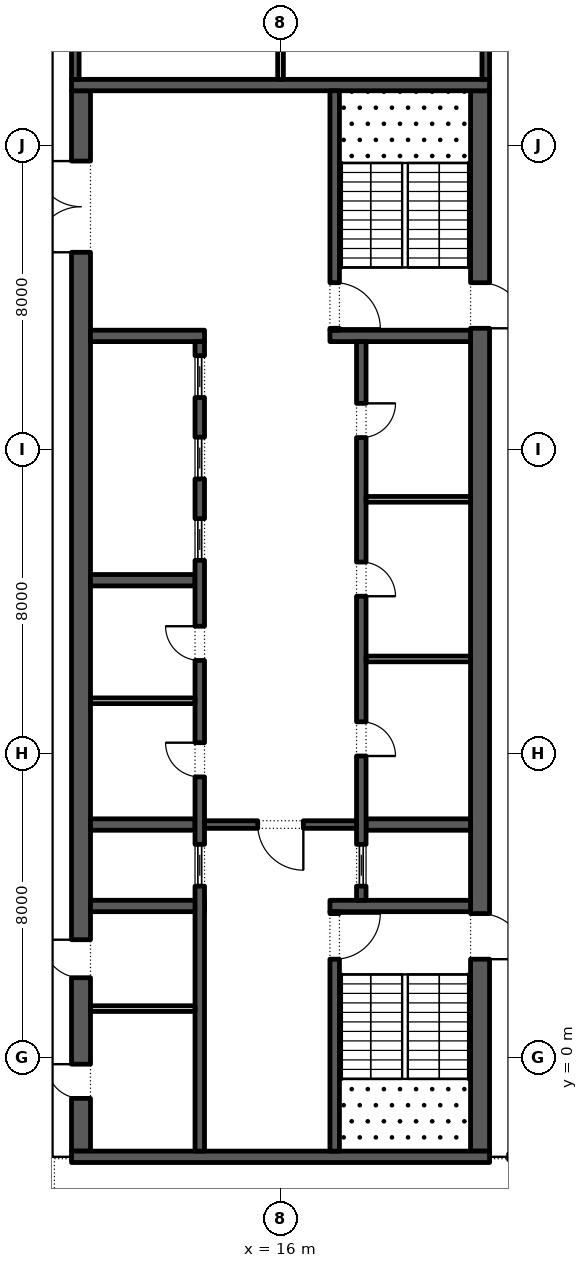
"""IFC4 building model, lengths in metres.
Left out: names, types, materials, properties, quantities, classifications, styles, units other than length and angle.
Written with IfcOpenShell. Run it as: python <this file> out.ifc"""

import sys

from ifc_helpers import new_model, si_unit, direction, frame, frame_2d, origin, place, context, subcontext, project, spatial, rectangle, extrude, element, fill, save


model = new_model("IFC4")
c1 = context("Model", 3, precision=1e-05, world=origin(), true_north=direction((0.0, 1.0)))
c2 = subcontext(c1, "Body", "Model", "MODEL_VIEW")
j1 = project(units=[si_unit("LENGTHUNIT", "METRE"), si_unit("PLANEANGLEUNIT", "RADIAN")], contexts=[c1])
p1 = place(None, origin())
s1 = spatial("IfcSite", under=j1, at=p1, CompositionType="ELEMENT")
p2 = place(p1, origin())
s2 = spatial("IfcBuilding", under=s1, at=p2, CompositionType="ELEMENT")
p3 = place(p2, frame((0.0, 0.0, 313.2)))
s3 = spatial("IfcBuildingStorey", under=s2, at=p3, CompositionType="ELEMENT", Elevation=313.2)
p4 = place(p3, frame((21.25, -2.45, 0.0), z_axis=(0.0, 0.0, 1.0), x_axis=(0.0, 1.0, 0.0)))
e1 = element("IfcWall", 1, at=p4, inside=s3, PredefinedType="SHEAR", context=c2, shape_type="SweptSolid", body=[
    extrude(rectangle(XDim=27.9, YDim=0.5, at=frame_2d((13.95, 0.0))), origin(), (0.0, 0.0, 1.0), 4.0),
])
p5 = place(p4, frame((5.05, 0.0, 0.0)))
e2 = element("IfcOpeningElement", 2, at=p5, cuts=e1, PredefinedType="OPENING", context=c2, shape_type="SweptSolid", body=[
    extrude(rectangle(XDim=1.2, YDim=2.1, at=frame_2d((0.6, 1.05))), frame((0.0, 0.26, 0.0), z_axis=(0.0, -1.0, 0.0), x_axis=(1.0, 0.0, 0.0)), (0.0, 0.0, 1.0), 0.52),
])
p6 = place(p4, frame((21.65, 0.0, 0.0)))
e3 = element("IfcOpeningElement", 3, at=p6, cuts=e1, PredefinedType="OPENING", context=c2, shape_type="SweptSolid", body=[
    extrude(rectangle(XDim=1.2, YDim=2.1, at=frame_2d((0.6, 1.05))), frame((0.0, 0.26, 0.0), z_axis=(0.0, -1.0, 0.0), x_axis=(1.0, 0.0, 0.0)), (0.0, 0.0, 1.0), 0.52),
])
p7 = place(p3, frame((10.75, -2.45, 0.0), z_axis=(0.0, 0.0, 1.0), x_axis=(0.0, 1.0, 0.0)))
e4 = element("IfcWall", 4, at=p7, inside=s3, PredefinedType="SHEAR", context=c2, shape_type="SweptSolid", body=[
    extrude(rectangle(XDim=27.9, YDim=0.5, at=frame_2d((13.95, 0.0))), origin(), (0.0, 0.0, 1.0), 4.0),
])
p8 = place(p7, frame((23.65, 0.0, 0.0)))
e5 = element("IfcOpeningElement", 5, at=p8, cuts=e4, PredefinedType="OPENING", context=c2, shape_type="SweptSolid", body=[
    extrude(rectangle(XDim=2.4, YDim=2.1, at=frame_2d((1.2, 1.05))), frame((0.0, 0.26, 0.0), z_axis=(0.0, -1.0, 0.0), x_axis=(1.0, 0.0, 0.0)), (0.0, 0.0, 1.0), 0.52),
])
p9 = place(p7, frame((1.387, 0.0, 0.0)))
e6 = element("IfcOpeningElement", 6, at=p9, cuts=e4, PredefinedType="OPENING", context=c2, shape_type="SweptSolid", body=[
    extrude(rectangle(XDim=0.9, YDim=2.1, at=frame_2d((0.45, 1.05))), frame((0.0, 0.26, 0.0), z_axis=(0.0, -1.0, 0.0), x_axis=(1.0, 0.0, 0.0)), (0.0, 0.0, 1.0), 0.52),
])
p10 = place(p7, frame((4.562, 0.0, 0.0)))
e7 = element("IfcOpeningElement", 7, at=p10, cuts=e4, PredefinedType="OPENING", context=c2, shape_type="SweptSolid", body=[
    extrude(rectangle(XDim=1.0, YDim=2.1, at=frame_2d((0.5, 1.05))), frame((0.0, 0.26, 0.0), z_axis=(0.0, -1.0, 0.0), x_axis=(1.0, 0.0, 0.0)), (0.0, 0.0, 1.0), 0.52),
])
for number, where, z_axis, x_axis in (
    (8, (10.5, -2.6, 0.0), (0.0, 0.0, 1.0), (1.0, 0.0, 0.0)),
    (9, (10.5, 25.6, 0.0), (0.0, 0.0, 1.0), (1.0, 0.0, 0.0)),
):
    element("IfcWall", number, at=place(p3, frame(where, z_axis=z_axis, x_axis=x_axis)), inside=s3, PredefinedType="SHEAR", context=c2, shape_type="SweptSolid", body=[
        extrude(rectangle(XDim=11.0, YDim=0.3, at=frame_2d((5.5, 0.0))), origin(), (0.0, 0.0, 1.0), 4.0),
    ])
p11 = place(p3, frame((17.3, 4.0, 0.0), z_axis=(0.0, 0.0, 1.0), x_axis=(1.0, 0.0, 0.0)))
e10 = element("IfcWall", 10, at=p11, inside=s3, PredefinedType="SHEAR", context=c2, shape_type="SweptSolid", body=[
    extrude(rectangle(XDim=3.7, YDim=0.3, at=frame_2d((1.85, 0.0))), origin(), (0.0, 0.0, 1.0), 4.0),
])
p12 = place(p3, frame((17.425, -2.45, 0.0), z_axis=(0.0, 0.0, 1.0), x_axis=(0.0, 1.0, 0.0)))
e11 = element("IfcWall", 11, at=p12, inside=s3, PredefinedType="SHEAR", context=c2, shape_type="SweptSolid", body=[
    extrude(rectangle(XDim=6.3, YDim=0.25, at=frame_2d((3.15, 0.0))), origin(), (0.0, 0.0, 1.0), 4.0),
])
p13 = place(p12, frame((5.05, 0.0, 0.0)))
e12 = element("IfcOpeningElement", 12, at=p13, cuts=e11, PredefinedType="OPENING", context=c2, shape_type="SweptSolid", body=[
    extrude(rectangle(XDim=1.2, YDim=2.1, at=frame_2d((0.6, 1.05))), frame((0.0, 0.135, 0.0), z_axis=(0.0, -1.0, 0.0), x_axis=(1.0, 0.0, 0.0)), (0.0, 0.0, 1.0), 0.27),
])
p14 = place(p3, frame((17.3, 19.0, 0.0), z_axis=(0.0, 0.0, 1.0), x_axis=(1.0, 0.0, 0.0)))
e13 = element("IfcWall", 13, at=p14, inside=s3, PredefinedType="SHEAR", context=c2, shape_type="SweptSolid", body=[
    extrude(rectangle(XDim=3.7, YDim=0.3, at=frame_2d((1.85, 0.0))), origin(), (0.0, 0.0, 1.0), 4.0),
])
p15 = place(p3, frame((17.425, 19.15, 0.0), z_axis=(0.0, 0.0, 1.0), x_axis=(0.0, 1.0, 0.0)))
e14 = element("IfcWall", 14, at=p15, inside=s3, PredefinedType="SHEAR", context=c2, shape_type="SweptSolid", body=[
    extrude(rectangle(XDim=6.3, YDim=0.25, at=frame_2d((3.15, 0.0))), origin(), (0.0, 0.0, 1.0), 4.0),
])
p16 = place(p15, frame((0.05, 0.0, 0.0)))
e15 = element("IfcOpeningElement", 15, at=p16, cuts=e14, PredefinedType="OPENING", context=c2, shape_type="SweptSolid", body=[
    extrude(rectangle(XDim=1.2, YDim=2.1, at=frame_2d((0.6, 1.05))), frame((0.0, 0.135, 0.0), z_axis=(0.0, -1.0, 0.0), x_axis=(1.0, 0.0, 0.0)), (0.0, 0.0, 1.0), 0.27),
])
p17 = place(p3, frame((18.25, 6.143, 0.0), z_axis=(0.0, 0.0, 1.0), x_axis=(1.0, 0.0, 0.0)))
e16 = element("IfcWall", 16, at=p17, inside=s3, PredefinedType="SHEAR", context=c2, shape_type="SweptSolid", body=[
    extrude(rectangle(XDim=2.75, YDim=0.3, at=frame_2d((1.375, 0.0))), origin(), (0.0, 0.0, 1.0), 4.0),
])
p18 = place(p3, frame((18.125, 4.15, 0.0), z_axis=(0.0, 0.0, 1.0), x_axis=(0.0, 1.0, 0.0)))
e17 = element("IfcWall", 17, at=p18, inside=s3, PredefinedType="SHEAR", context=c2, shape_type="SweptSolid", body=[
    extrude(rectangle(XDim=14.7, YDim=0.25, at=frame_2d((7.35, 0.0))), origin(), (0.0, 0.0, 1.0), 4.0),
])
p19 = place(p18, frame((3.796, 0.0, 0.0)))
e18 = element("IfcOpeningElement", 18, at=p19, cuts=e17, PredefinedType="OPENING", context=c2, shape_type="SweptSolid", body=[
    extrude(rectangle(XDim=0.9, YDim=2.1, at=frame_2d((0.45, 1.05))), frame((0.0, 0.135, 0.0), z_axis=(0.0, -1.0, 0.0), x_axis=(1.0, 0.0, 0.0)), (0.0, 0.0, 1.0), 0.27),
])
p20 = place(p18, frame((8.0, 0.0, 0.0)))
e19 = element("IfcOpeningElement", 19, at=p20, cuts=e17, PredefinedType="OPENING", context=c2, shape_type="SweptSolid", body=[
    extrude(rectangle(XDim=0.9, YDim=2.1, at=frame_2d((0.45, 1.05))), frame((0.0, 0.135, 0.0), z_axis=(0.0, -1.0, 0.0), x_axis=(1.0, 0.0, 0.0)), (0.0, 0.0, 1.0), 0.27),
])
p21 = place(p18, frame((12.175, 0.0, 0.0)))
e20 = element("IfcOpeningElement", 20, at=p21, cuts=e17, PredefinedType="OPENING", context=c2, shape_type="SweptSolid", body=[
    extrude(rectangle(XDim=0.9, YDim=2.1, at=frame_2d((0.45, 1.05))), frame((0.0, 0.135, 0.0), z_axis=(0.0, -1.0, 0.0), x_axis=(1.0, 0.0, 0.0)), (0.0, 0.0, 1.0), 0.27),
])
p22 = place(p18, frame((0.371, 0.0, 0.0)))
e21 = element("IfcOpeningElement", 21, at=p22, cuts=e17, PredefinedType="OPENING", context=c2, shape_type="SweptSolid", body=[
    extrude(rectangle(XDim=1.1, YDim=2.1, at=frame_2d((0.55, 1.05))), frame((0.0, 0.135, 0.0), z_axis=(0.0, -1.0, 0.0), x_axis=(1.0, 0.0, 0.0)), (0.0, 0.0, 1.0), 0.27),
])
for number, where, z_axis, x_axis in (
    (22, (18.25, 10.5, 0.0), (0.0, 0.0, 1.0), (1.0, 0.0, 0.0)),
    (23, (18.25, 14.7, 0.0), (0.0, 0.0, 1.0), (1.0, 0.0, 0.0)),
):
    element("IfcWall", number, at=place(p3, frame(where, z_axis=z_axis, x_axis=x_axis)), inside=s3, PredefinedType="PARTITIONING", context=c2, shape_type="SweptSolid", body=[
        extrude(rectangle(XDim=2.75, YDim=0.15, at=frame_2d((1.375, 0.0))), origin(), (0.0, 0.0, 1.0), 4.0),
    ])
p23 = place(p3, frame((11.0, 4.0, 0.0), z_axis=(0.0, 0.0, 1.0), x_axis=(1.0, 0.0, 0.0)))
e24 = element("IfcWall", 24, at=p23, inside=s3, PredefinedType="SHEAR", context=c2, shape_type="SweptSolid", body=[
    extrude(rectangle(XDim=3.0, YDim=0.3, at=frame_2d((1.5, 0.0))), origin(), (0.0, 0.0, 1.0), 4.0),
])
for number, where, z_axis, x_axis in (
    (25, (11.0, 6.143, 0.0), (0.0, 0.0, 1.0), (1.0, 0.0, 0.0)),
    (26, (11.0, 12.571, 0.0), (0.0, 0.0, 1.0), (1.0, 0.0, 0.0)),
):
    element("IfcWall", number, at=place(p3, frame(where, z_axis=z_axis, x_axis=x_axis)), inside=s3, PredefinedType="SHEAR", context=c2, shape_type="SweptSolid", body=[
        extrude(rectangle(XDim=2.75, YDim=0.3, at=frame_2d((1.375, 0.0))), origin(), (0.0, 0.0, 1.0), 4.0),
    ])
p24 = place(p3, frame((11.0, 19.0, 0.0), z_axis=(0.0, 0.0, 1.0), x_axis=(1.0, 0.0, 0.0)))
e27 = element("IfcWall", 27, at=p24, inside=s3, PredefinedType="SHEAR", context=c2, shape_type="SweptSolid", body=[
    extrude(rectangle(XDim=3.0, YDim=0.3, at=frame_2d((1.5, 0.0))), origin(), (0.0, 0.0, 1.0), 4.0),
])
p25 = place(p3, frame((13.875, -2.45, 0.0), z_axis=(0.0, 0.0, 1.0), x_axis=(0.0, 1.0, 0.0)))
e28 = element("IfcWall", 28, at=p25, inside=s3, PredefinedType="SHEAR", context=c2, shape_type="SweptSolid", body=[
    extrude(rectangle(XDim=21.3, YDim=0.25, at=frame_2d((10.65, 0.0))), origin(), (0.0, 0.0, 1.0), 4.0),
])
p26 = place(p25, frame((9.846, 0.0, 0.0)))
e29 = element("IfcOpeningElement", 29, at=p26, cuts=e28, PredefinedType="OPENING", context=c2, shape_type="SweptSolid", body=[
    extrude(rectangle(XDim=0.9, YDim=2.1, at=frame_2d((0.45, 1.05))), frame((0.0, 0.135, 0.0), z_axis=(0.0, -1.0, 0.0), x_axis=(1.0, 0.0, 0.0)), (0.0, 0.0, 1.0), 0.27),
])
p27 = place(p25, frame((12.911, 0.0, 0.0)))
e30 = element("IfcOpeningElement", 30, at=p27, cuts=e28, PredefinedType="OPENING", context=c2, shape_type="SweptSolid", body=[
    extrude(rectangle(XDim=0.9, YDim=2.1, at=frame_2d((0.45, 1.05))), frame((0.0, 0.135, 0.0), z_axis=(0.0, -1.0, 0.0), x_axis=(1.0, 0.0, 0.0)), (0.0, 0.0, 1.0), 0.27),
])
p28 = place(p25, frame((6.971, 0.0, 0.0)))
e31 = element("IfcOpeningElement", 31, at=p28, cuts=e28, PredefinedType="OPENING", context=c2, shape_type="SweptSolid", body=[
    extrude(rectangle(XDim=1.1, YDim=2.1, at=frame_2d((0.55, 1.05))), frame((0.0, 0.135, 0.0), z_axis=(0.0, -1.0, 0.0), x_axis=(1.0, 0.0, 0.0)), (0.0, 0.0, 1.0), 0.27),
])
p29 = place(p25, frame((15.543, 0.0, 0.0)))
e32 = element("IfcOpeningElement", 32, at=p29, cuts=e28, PredefinedType="OPENING", context=c2, shape_type="SweptSolid", body=[
    extrude(rectangle(XDim=1.1, YDim=2.1, at=frame_2d((0.55, 1.05))), frame((0.0, 0.135, 0.0), z_axis=(0.0, -1.0, 0.0), x_axis=(1.0, 0.0, 0.0)), (0.0, 0.0, 1.0), 0.27),
])
p30 = place(p25, frame((17.686, 0.0, 0.0)))
e33 = element("IfcOpeningElement", 33, at=p30, cuts=e28, PredefinedType="OPENING", context=c2, shape_type="SweptSolid", body=[
    extrude(rectangle(XDim=1.1, YDim=2.1, at=frame_2d((0.55, 1.05))), frame((0.0, 0.135, 0.0), z_axis=(0.0, -1.0, 0.0), x_axis=(1.0, 0.0, 0.0)), (0.0, 0.0, 1.0), 0.27),
])
p31 = place(p25, frame((19.829, 0.0, 0.0)))
e34 = element("IfcOpeningElement", 34, at=p31, cuts=e28, PredefinedType="OPENING", context=c2, shape_type="SweptSolid", body=[
    extrude(rectangle(XDim=1.1, YDim=2.1, at=frame_2d((0.55, 1.05))), frame((0.0, 0.135, 0.0), z_axis=(0.0, -1.0, 0.0), x_axis=(1.0, 0.0, 0.0)), (0.0, 0.0, 1.0), 0.27),
])
p32 = place(p3, frame((11.0, 9.4, 0.0), z_axis=(0.0, 0.0, 1.0), x_axis=(1.0, 0.0, 0.0)))
e35 = element("IfcWall", 35, at=p32, inside=s3, PredefinedType="PARTITIONING", context=c2, shape_type="SweptSolid", body=[
    extrude(rectangle(XDim=2.75, YDim=0.15, at=frame_2d((1.375, 0.0))), origin(), (0.0, 0.0, 1.0), 4.0),
])
p33 = place(p3, frame((14.0, 6.143, 0.0), z_axis=(0.0, 0.0, 1.0), x_axis=(1.0, 0.0, 0.0)))
e36 = element("IfcWall", 36, at=p33, inside=s3, PredefinedType="SHEAR", context=c2, shape_type="SweptSolid", body=[
    extrude(rectangle(XDim=4.0, YDim=0.2, at=frame_2d((2.0, 0.0))), origin(), (0.0, 0.0, 1.0), 4.0),
])
p34 = place(p33, frame((1.4, 0.0, 0.0)))
e37 = element("IfcOpeningElement", 37, at=p34, cuts=e36, PredefinedType="OPENING", context=c2, shape_type="SweptSolid", body=[
    extrude(rectangle(XDim=1.2, YDim=2.1, at=frame_2d((0.6, 1.05))), frame((0.0, 0.11, 0.0), z_axis=(0.0, -1.0, 0.0), x_axis=(1.0, 0.0, 0.0)), (0.0, 0.0, 1.0), 0.22),
])
p35 = place(p3, frame((11.0, 1.3, 0.0), z_axis=(0.0, 0.0, 1.0), x_axis=(1.0, 0.0, 0.0)))
e38 = element("IfcWall", 38, at=p35, inside=s3, PredefinedType="PARTITIONING", context=c2, shape_type="SweptSolid", body=[
    extrude(rectangle(XDim=2.75, YDim=0.15, at=frame_2d((1.375, 0.0))), origin(), (0.0, 0.0, 1.0), 4.0),
])
p36 = place(p3, frame((21.4, 25.75, 0.0), z_axis=(0.0, 0.0, 1.0), x_axis=(0.0, 1.0, 0.0)))
e39 = element("IfcWall", 39, at=p36, inside=s3, PredefinedType="SHEAR", context=c2, shape_type="SweptSolid", body=[
    extrude(rectangle(XDim=15.05, YDim=0.2, at=frame_2d((7.525, 0.0))), origin(), (0.0, 0.0, 1.0), 4.0),
])
p37 = place(p36, frame((7.075, 0.0, 0.0)))
e40 = element("IfcOpeningElement", 40, at=p37, cuts=e39, PredefinedType="OPENING", context=c2, shape_type="SweptSolid", body=[
    extrude(rectangle(XDim=0.9, YDim=2.1, at=frame_2d((0.45, 1.05))), frame((0.0, 0.11, 0.0), z_axis=(0.0, -1.0, 0.0), x_axis=(1.0, 0.0, 0.0)), (0.0, 0.0, 1.0), 0.22),
])
p38 = place(p3, frame((10.6, 25.75, 0.0), z_axis=(0.0, 0.0, 1.0), x_axis=(0.0, 1.0, 0.0)))
e41 = element("IfcWall", 41, at=p38, inside=s3, PredefinedType="SHEAR", context=c2, shape_type="SweptSolid", body=[
    extrude(rectangle(XDim=15.05, YDim=0.2, at=frame_2d((7.525, 0.0))), origin(), (0.0, 0.0, 1.0), 4.0),
])
p39 = place(p38, frame((7.075, 0.0, 0.0)))
e42 = element("IfcOpeningElement", 42, at=p39, cuts=e41, PredefinedType="OPENING", context=c2, shape_type="SweptSolid", body=[
    extrude(rectangle(XDim=0.9, YDim=2.1, at=frame_2d((0.45, 1.05))), frame((0.0, 0.11, 0.0), z_axis=(0.0, -1.0, 0.0), x_axis=(1.0, 0.0, 0.0)), (0.0, 0.0, 1.0), 0.22),
])
p40 = place(p3, frame((16.0, 25.75, 0.0), z_axis=(0.0, 0.0, 1.0), x_axis=(0.0, 1.0, 0.0)))
e43 = element("IfcWall", 43, at=p40, inside=s3, PredefinedType="PARTITIONING", context=c2, shape_type="SweptSolid", body=[
    extrude(rectangle(XDim=15.05, YDim=0.15, at=frame_2d((7.525, 0.0))), origin(), (0.0, 0.0, 1.0), 4.0),
])
p41 = place(p19, frame((0.9, -0.2, 0.0), z_axis=(0.0, 0.0, 1.0), x_axis=(-1.0, 0.0, 0.0)))
e44 = element("IfcDoor", 44, at=p41, inside=s3, OperationType="SINGLE_SWING_LEFT", PredefinedType="DOOR", context=c2, shape_type="SweptSolid", body=[
    extrude(rectangle(XDim=0.9, YDim=2.1, at=frame_2d((0.45, 1.05))), frame((0.0, -0.075, 0.0), z_axis=(0.0, -1.0, 0.0), x_axis=(1.0, 0.0, 0.0)), (0.0, 0.0, 1.0), 0.05),
])
fill(e18, e44)
p42 = place(p20, frame((0.9, -0.2, 0.0), z_axis=(0.0, 0.0, 1.0), x_axis=(-1.0, 0.0, 0.0)))
e45 = element("IfcDoor", 45, at=p42, inside=s3, OperationType="SINGLE_SWING_LEFT", PredefinedType="DOOR", context=c2, shape_type="SweptSolid", body=[
    extrude(rectangle(XDim=0.9, YDim=2.1, at=frame_2d((0.45, 1.05))), frame((0.0, -0.075, 0.0), z_axis=(0.0, -1.0, 0.0), x_axis=(1.0, 0.0, 0.0)), (0.0, 0.0, 1.0), 0.05),
])
fill(e19, e45)
p43 = place(p21, frame((0.9, -0.2, 0.0), z_axis=(0.0, 0.0, 1.0), x_axis=(-1.0, 0.0, 0.0)))
e46 = element("IfcDoor", 46, at=p43, inside=s3, OperationType="SINGLE_SWING_RIGHT", PredefinedType="DOOR", context=c2, shape_type="SweptSolid", body=[
    extrude(rectangle(XDim=0.9, YDim=2.1, at=frame_2d((0.45, 1.05))), frame((0.0, -0.075, 0.0), z_axis=(0.0, -1.0, 0.0), x_axis=(1.0, 0.0, 0.0)), (0.0, 0.0, 1.0), 0.05),
])
fill(e20, e46)
p44 = place(p22, origin())
e47 = element("IfcDoor", 47, at=p44, inside=s3, OperationType="SLIDING_TO_LEFT", PredefinedType="DOOR", context=c2, shape_type="SweptSolid", body=[
    extrude(rectangle(XDim=1.1, YDim=2.1, at=frame_2d((0.55, 1.05))), frame((0.0, 0.025, 0.0), z_axis=(0.0, -1.0, 0.0), x_axis=(1.0, 0.0, 0.0)), (0.0, 0.0, 1.0), 0.05),
])
fill(e21, e47)
p45 = place(p26, origin())
e48 = element("IfcDoor", 48, at=p45, inside=s3, OperationType="SINGLE_SWING_LEFT", PredefinedType="DOOR", context=c2, shape_type="SweptSolid", body=[
    extrude(rectangle(XDim=0.9, YDim=2.1, at=frame_2d((0.45, 1.05))), frame((0.0, 0.125, 0.0), z_axis=(0.0, -1.0, 0.0), x_axis=(1.0, 0.0, 0.0)), (0.0, 0.0, 1.0), 0.05),
])
fill(e29, e48)
p46 = place(p27, origin())
e49 = element("IfcDoor", 49, at=p46, inside=s3, OperationType="SINGLE_SWING_LEFT", PredefinedType="DOOR", context=c2, shape_type="SweptSolid", body=[
    extrude(rectangle(XDim=0.9, YDim=2.1, at=frame_2d((0.45, 1.05))), frame((0.0, 0.125, 0.0), z_axis=(0.0, -1.0, 0.0), x_axis=(1.0, 0.0, 0.0)), (0.0, 0.0, 1.0), 0.05),
])
fill(e30, e49)
p47 = place(p28, origin())
e50 = element("IfcDoor", 50, at=p47, inside=s3, OperationType="SLIDING_TO_LEFT", PredefinedType="DOOR", context=c2, shape_type="SweptSolid", body=[
    extrude(rectangle(XDim=1.1, YDim=2.1, at=frame_2d((0.55, 1.05))), frame((0.0, 0.025, 0.0), z_axis=(0.0, -1.0, 0.0), x_axis=(1.0, 0.0, 0.0)), (0.0, 0.0, 1.0), 0.05),
])
fill(e31, e50)
p48 = place(p29, origin())
e51 = element("IfcDoor", 51, at=p48, inside=s3, OperationType="SLIDING_TO_LEFT", PredefinedType="DOOR", context=c2, shape_type="SweptSolid", body=[
    extrude(rectangle(XDim=1.1, YDim=2.1, at=frame_2d((0.55, 1.05))), frame((0.0, 0.025, 0.0), z_axis=(0.0, -1.0, 0.0), x_axis=(1.0, 0.0, 0.0)), (0.0, 0.0, 1.0), 0.05),
])
fill(e32, e51)
p49 = place(p30, origin())
e52 = element("IfcDoor", 52, at=p49, inside=s3, OperationType="SLIDING_TO_LEFT", PredefinedType="DOOR", context=c2, shape_type="SweptSolid", body=[
    extrude(rectangle(XDim=1.1, YDim=2.1, at=frame_2d((0.55, 1.05))), frame((0.0, 0.025, 0.0), z_axis=(0.0, -1.0, 0.0), x_axis=(1.0, 0.0, 0.0)), (0.0, 0.0, 1.0), 0.05),
])
fill(e33, e52)
p50 = place(p31, origin())
e53 = element("IfcDoor", 53, at=p50, inside=s3, OperationType="SLIDING_TO_LEFT", PredefinedType="DOOR", context=c2, shape_type="SweptSolid", body=[
    extrude(rectangle(XDim=1.1, YDim=2.1, at=frame_2d((0.55, 1.05))), frame((0.0, 0.025, 0.0), z_axis=(0.0, -1.0, 0.0), x_axis=(1.0, 0.0, 0.0)), (0.0, 0.0, 1.0), 0.05),
])
fill(e34, e53)
p51 = place(p34, frame((1.2, 0.0, 0.0), z_axis=(0.0, 0.0, 1.0), x_axis=(-1.0, 0.0, 0.0)))
e54 = element("IfcDoor", 54, at=p51, inside=s3, OperationType="SINGLE_SWING_RIGHT", PredefinedType="DOOR", context=c2, shape_type="SweptSolid", body=[
    extrude(rectangle(XDim=1.2, YDim=2.1, at=frame_2d((0.6, 1.05))), frame((0.0, 0.025, 0.0), z_axis=(0.0, -1.0, 0.0), x_axis=(1.0, 0.0, 0.0)), (0.0, 0.0, 1.0), 0.05),
])
fill(e37, e54)
p52 = place(p8, origin())
e55 = element("IfcDoor", 55, at=p52, inside=s3, OperationType="DOUBLE_DOOR_SINGLE_SWING", PredefinedType="DOOR", context=c2, shape_type="SweptSolid", body=[
    extrude(rectangle(XDim=2.4, YDim=2.1, at=frame_2d((1.2, 1.05))), frame((0.0, 0.025, 0.0), z_axis=(0.0, -1.0, 0.0), x_axis=(1.0, 0.0, 0.0)), (0.0, 0.0, 1.0), 0.05),
])
fill(e5, e55)
p53 = place(p13, frame((1.2, 0.0, 0.0), z_axis=(0.0, 0.0, 1.0), x_axis=(-1.0, 0.0, 0.0)))
e56 = element("IfcDoor", 56, at=p53, inside=s3, OperationType="SINGLE_SWING_RIGHT", PredefinedType="DOOR", context=c2, shape_type="SweptSolid", body=[
    extrude(rectangle(XDim=1.2, YDim=2.1, at=frame_2d((0.6, 1.05))), frame((0.0, 0.025, 0.0), z_axis=(0.0, -1.0, 0.0), x_axis=(1.0, 0.0, 0.0)), (0.0, 0.0, 1.0), 0.05),
])
fill(e12, e56)
p54 = place(p5, frame((1.2, 0.0, 0.0), z_axis=(0.0, 0.0, 1.0), x_axis=(-1.0, 0.0, 0.0)))
e57 = element("IfcDoor", 57, at=p54, inside=s3, OperationType="SINGLE_SWING_LEFT", PredefinedType="DOOR", context=c2, shape_type="SweptSolid", body=[
    extrude(rectangle(XDim=1.2, YDim=2.1, at=frame_2d((0.6, 1.05))), frame((0.0, 0.025, 0.0), z_axis=(0.0, -1.0, 0.0), x_axis=(1.0, 0.0, 0.0)), (0.0, 0.0, 1.0), 0.05),
])
fill(e2, e57)
p55 = place(p16, frame((1.2, 0.0, 0.0), z_axis=(0.0, 0.0, 1.0), x_axis=(-1.0, 0.0, 0.0)))
e58 = element("IfcDoor", 58, at=p55, inside=s3, OperationType="SINGLE_SWING_LEFT", PredefinedType="DOOR", context=c2, shape_type="SweptSolid", body=[
    extrude(rectangle(XDim=1.2, YDim=2.1, at=frame_2d((0.6, 1.05))), frame((0.0, 0.025, 0.0), z_axis=(0.0, -1.0, 0.0), x_axis=(1.0, 0.0, 0.0)), (0.0, 0.0, 1.0), 0.05),
])
fill(e15, e58)
p56 = place(p6, frame((1.2, 0.0, 0.0), z_axis=(0.0, 0.0, 1.0), x_axis=(-1.0, 0.0, 0.0)))
e59 = element("IfcDoor", 59, at=p56, inside=s3, OperationType="SINGLE_SWING_LEFT", PredefinedType="DOOR", context=c2, shape_type="SweptSolid", body=[
    extrude(rectangle(XDim=1.2, YDim=2.1, at=frame_2d((0.6, 1.05))), frame((0.0, 0.025, 0.0), z_axis=(0.0, -1.0, 0.0), x_axis=(1.0, 0.0, 0.0)), (0.0, 0.0, 1.0), 0.05),
])
fill(e3, e59)
p57 = place(p9, origin())
e60 = element("IfcDoor", 60, at=p57, inside=s3, OperationType="SINGLE_SWING_LEFT", PredefinedType="DOOR", context=c2, shape_type="SweptSolid", body=[
    extrude(rectangle(XDim=0.9, YDim=2.1, at=frame_2d((0.45, 1.05))), frame((0.0, -0.2, 0.0), z_axis=(0.0, -1.0, 0.0), x_axis=(1.0, 0.0, 0.0)), (0.0, 0.0, 1.0), 0.05),
])
fill(e6, e60)
p58 = place(p10, origin())
e61 = element("IfcDoor", 61, at=p58, inside=s3, OperationType="SINGLE_SWING_LEFT", PredefinedType="DOOR", context=c2, shape_type="SweptSolid", body=[
    extrude(rectangle(XDim=1.0, YDim=2.1, at=frame_2d((0.5, 1.05))), frame((0.0, -0.2, 0.0), z_axis=(0.0, -1.0, 0.0), x_axis=(1.0, 0.0, 0.0)), (0.0, 0.0, 1.0), 0.05),
])
fill(e7, e61)
save(model, sys.argv[1])
